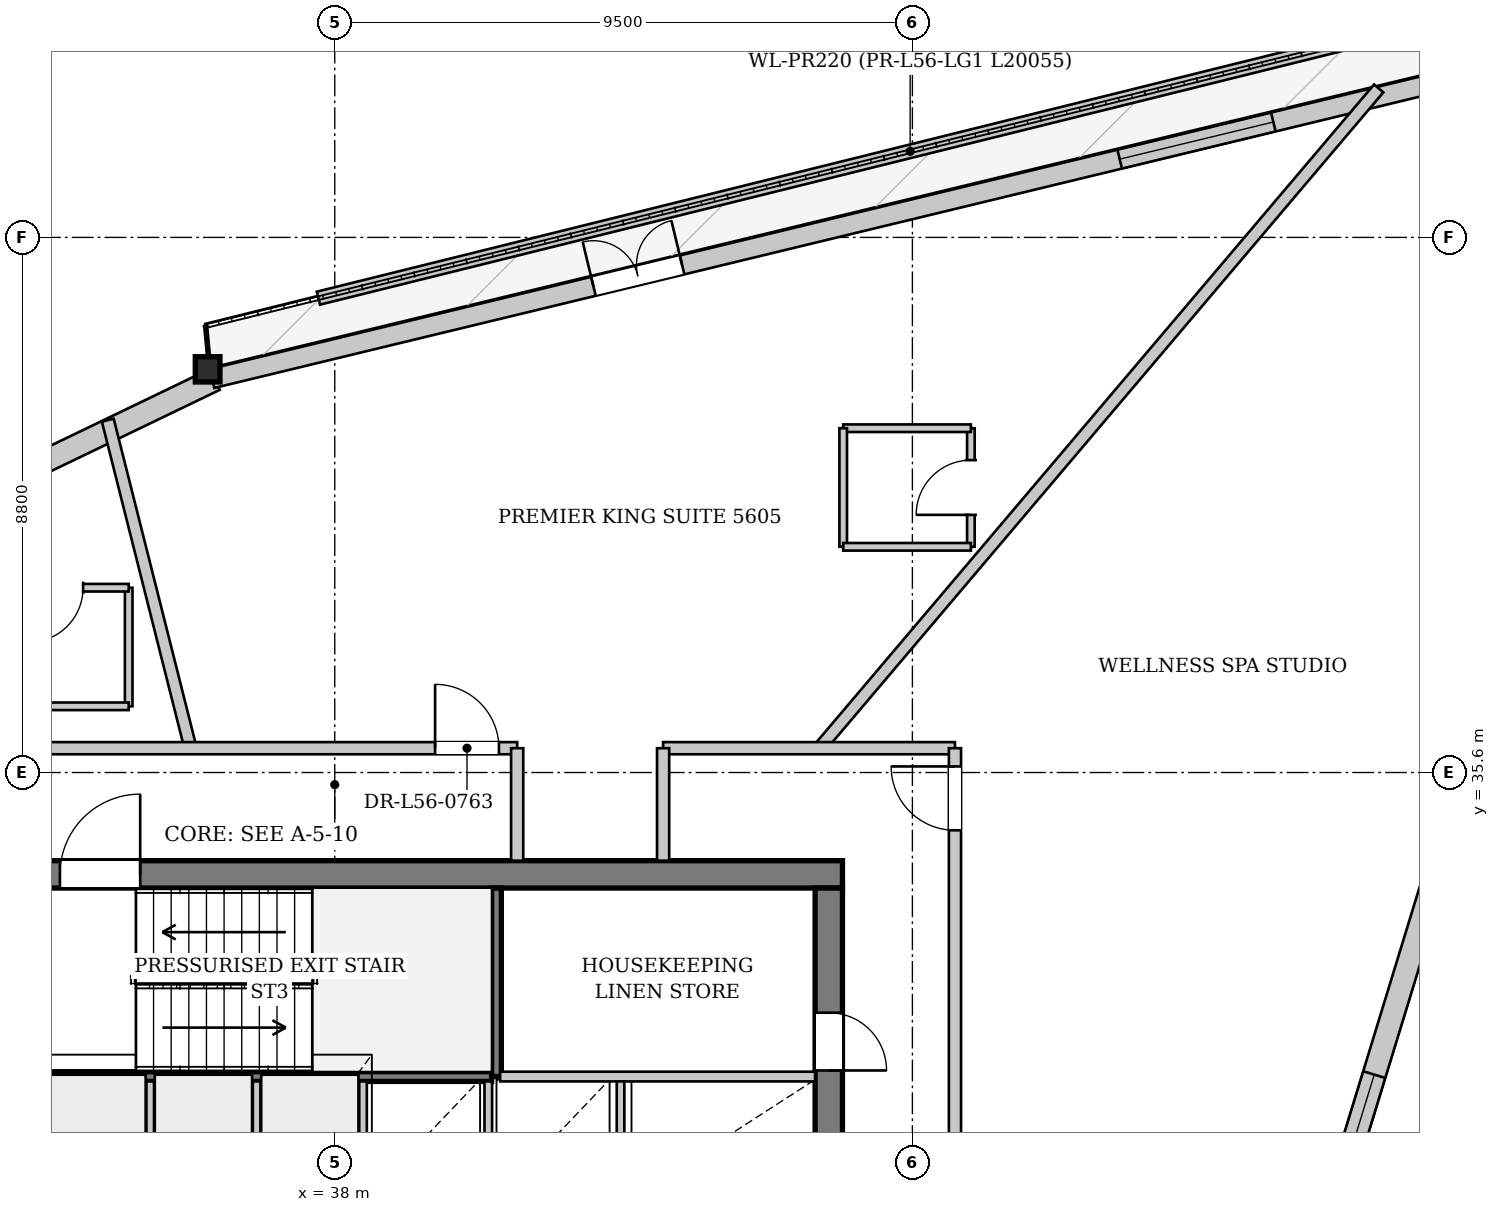
"""IFC4 building model, lengths in metres.
Left out: names, types, materials, properties, quantities, classifications, styles, units other than length and angle.
Written with IfcOpenShell. Run it as: python <this file> out.ifc"""

import sys

from ifc_helpers import new_model, si_unit, direction, frame, frame_2d, origin, origin_2d, place, context, subcontext, project, spatial, rectangle, i_section, extrude, source, transform, mapped, element, fill, save


model = new_model("IFC4")
c1 = context("Model", 3, precision=1e-05, world=origin(), true_north=direction((0.0, 1.0)))
c2 = subcontext(c1, "Body", "Model", "MODEL_VIEW")
j1 = project(units=[si_unit("LENGTHUNIT", "METRE"), si_unit("PLANEANGLEUNIT", "RADIAN")], contexts=[c1])
p1 = place(None, origin())
s1 = spatial("IfcSite", under=j1, at=p1, CompositionType="ELEMENT")
p2 = place(p1, origin())
s2 = spatial("IfcBuilding", under=s1, at=p2, CompositionType="ELEMENT")
p3 = place(p2, frame((0.0, 0.0, 213.15)))
s3 = spatial("IfcBuildingStorey", under=s2, at=p3, CompositionType="ELEMENT", Elevation=213.15)
m1 = source(origin(), c2, "Body", "SweptSolid", [
    extrude(i_section(OverallWidth=0.406, OverallDepth=0.416, WebThickness=0.027, FlangeThickness=0.042, at=origin_2d()), origin(), (0.0, 0.0, 1.0), 3.386),
])
p4 = place(p3, frame((35.943, 42.235, 0.0), z_axis=(-0.02011846258, -0.002740149025, 0.999793848274), x_axis=(0.134954720894, -0.990851766567, 0.0)))
e1 = element("IfcColumn", 1, at=p4, inside=s3, PredefinedType="COLUMN", context=c2, shape_type="MappedRepresentation", body=[
    mapped(m1, transform((0.0, 0.0, 0.0), x_axis=(1.0, 0.0, 0.0), y_axis=(0.0, 1.0, 0.0), z_axis=(0.0, 0.0, 1.0), scale=1.0)),
])
p5 = place(p3, frame((15.745, 32.294, 0.0), z_axis=(0.0, 0.0, 1.0), x_axis=(0.900909174289, 0.434007672377, 0.0)))
e2 = element("IfcWall", 2, at=p5, inside=s3, PredefinedType="SOLIDWALL", context=c2, shape_type="SweptSolid", body=[
    extrude(rectangle(XDim=22.511, YDim=0.38, at=frame_2d((11.256, 0.0))), origin(), (0.0, 0.0, 1.0), 2.822),
])
p6 = place(p5, frame((5.653, 0.0, 0.452)))
e3 = element("IfcOpeningElement", 3, at=p6, cuts=e2, PredefinedType="OPENING", context=c2, shape_type="SweptSolid", body=[
    extrude(rectangle(XDim=2.2, YDim=2.25, at=frame_2d((1.1, 1.125))), frame((0.0, 0.2, 0.0), z_axis=(0.0, -1.0, 0.0), x_axis=(1.0, 0.0, 0.0)), (0.0, 0.0, 1.0), 0.4),
])
p7 = place(p5, frame((15.108, 0.0, 0.452)))
e4 = element("IfcOpeningElement", 4, at=p7, cuts=e2, PredefinedType="OPENING", context=c2, shape_type="SweptSolid", body=[
    extrude(rectangle(XDim=2.2, YDim=2.25, at=frame_2d((1.1, 1.125))), frame((0.0, 0.2, 0.0), z_axis=(0.0, -1.0, 0.0), x_axis=(1.0, 0.0, 0.0)), (0.0, 0.0, 1.0), 0.4),
])
p8 = place(p3, frame((35.981, 42.079, 0.0), z_axis=(0.0, 0.0, 1.0), x_axis=(0.97201999071, 0.234898143159, 0.0)))
e5 = element("IfcWall", 5, at=p8, inside=s3, PredefinedType="SOLIDWALL", context=c2, shape_type="SweptSolid", body=[
    extrude(rectangle(XDim=22.511, YDim=0.32, at=frame_2d((11.256, 0.0))), origin(), (0.0, 0.0, 1.0), 2.822),
])
p9 = place(p8, frame((6.454, 0.0, 0.0)))
e6 = element("IfcOpeningElement", 6, at=p9, cuts=e5, PredefinedType="OPENING", context=c2, shape_type="SweptSolid", body=[
    extrude(rectangle(XDim=1.5, YDim=2.3, at=frame_2d((0.75, 1.15))), frame((0.0, 0.17, 0.0), z_axis=(0.0, -1.0, 0.0), x_axis=(1.0, 0.0, 0.0)), (0.0, 0.0, 1.0), 0.34),
])
p10 = place(p8, frame((15.358, 0.0, 0.352)))
e7 = element("IfcOpeningElement", 7, at=p10, cuts=e5, PredefinedType="OPENING", context=c2, shape_type="SweptSolid", body=[
    extrude(rectangle(XDim=2.6, YDim=2.35, at=frame_2d((1.3, 1.175))), frame((0.0, 0.17, 0.0), z_axis=(0.0, -1.0, 0.0), x_axis=(1.0, 0.0, 0.0)), (0.0, 0.0, 1.0), 0.34),
])
p11 = place(p3, frame((59.639, 45.464, 0.0), z_axis=(0.0, 0.0, 1.0), x_axis=(-0.292879532816, -0.95614934987, 0.0)))
e8 = element("IfcWall", 8, at=p11, inside=s3, PredefinedType="SOLIDWALL", context=c2, shape_type="SweptSolid", body=[
    extrude(rectangle(XDim=23.072, YDim=0.38, at=frame_2d((11.536, 0.0))), origin(), (0.0, 0.0, 1.0), 2.822),
])
p12 = place(p11, frame((5.36, 0.0, 0.452)))
e9 = element("IfcOpeningElement", 9, at=p12, cuts=e8, PredefinedType="OPENING", context=c2, shape_type="SweptSolid", body=[
    extrude(rectangle(XDim=2.2, YDim=2.25, at=frame_2d((1.1, 1.125))), frame((0.0, 0.2, 0.0), z_axis=(0.0, -1.0, 0.0), x_axis=(1.0, 0.0, 0.0)), (0.0, 0.0, 1.0), 0.4),
])
p13 = place(p11, frame((15.512, 0.0, 0.452)))
e10 = element("IfcOpeningElement", 10, at=p13, cuts=e8, PredefinedType="OPENING", context=c2, shape_type="SweptSolid", body=[
    extrude(rectangle(XDim=2.2, YDim=2.25, at=frame_2d((1.1, 1.125))), frame((0.0, 0.2, 0.0), z_axis=(0.0, -1.0, 0.0), x_axis=(1.0, 0.0, 0.0)), (0.0, 0.0, 1.0), 0.4),
])
p14 = place(p3, frame((57.196, 48.23, 0.0), z_axis=(0.0, 0.0, 1.0), x_axis=(-0.970576322009, -0.240793694177, 0.0)))
e11 = element("IfcWall", 11, at=p14, inside=s3, PredefinedType="PARAPET", context=c2, shape_type="SweptSolid", body=[
    extrude(rectangle(XDim=20.055, YDim=0.22, at=frame_2d((10.027, 0.0))), origin(), (0.0, 0.0, 1.0), 0.3),
])
p15 = place(p3, frame((29.65, 33.925, 0.0), z_axis=(0.0, 0.0, 1.0), x_axis=(1.0, 0.0, 0.0)))
e12 = element("IfcWall", 12, at=p15, inside=s3, PredefinedType="SHEAR", context=c2, shape_type="SweptSolid", body=[
    extrude(rectangle(XDim=16.7, YDim=0.45, at=frame_2d((8.35, 0.0))), origin(), (0.0, 0.0, 1.0), 3.33),
])
p16 = place(p15, frame((1.45, 0.0, 0.0)))
e13 = element("IfcOpeningElement", 13, at=p16, cuts=e12, PredefinedType="OPENING", context=c2, shape_type="SweptSolid", body=[
    extrude(rectangle(XDim=0.95, YDim=2.1, at=frame_2d((0.475, 1.05))), frame((0.0, 0.235, 0.0), z_axis=(0.0, -1.0, 0.0), x_axis=(1.0, 0.0, 0.0)), (0.0, 0.0, 1.0), 0.47),
])
p17 = place(p15, frame((3.83, 0.0, 0.0)))
e14 = element("IfcOpeningElement", 14, at=p17, cuts=e12, PredefinedType="OPENING", context=c2, shape_type="SweptSolid", body=[
    extrude(rectangle(XDim=1.32, YDim=2.2, at=frame_2d((0.66, 1.1))), frame((0.0, 0.235, 0.0), z_axis=(0.0, -1.0, 0.0), x_axis=(1.0, 0.0, 0.0)), (0.0, 0.0, 1.0), 0.47),
])
p18 = place(p3, frame((46.125, 33.7, 0.0), z_axis=(0.0, 0.0, 1.0), x_axis=(0.0, -1.0, 0.0)))
e15 = element("IfcWall", 15, at=p18, inside=s3, PredefinedType="SHEAR", context=c2, shape_type="SweptSolid", body=[
    extrude(rectangle(XDim=14.2, YDim=0.45, at=frame_2d((7.1, 0.0))), origin(), (0.0, 0.0, 1.0), 3.33),
])
p19 = place(p18, frame((5.18, 0.0, 0.0)))
e16 = element("IfcOpeningElement", 16, at=p19, cuts=e15, PredefinedType="OPENING", context=c2, shape_type="SweptSolid", body=[
    extrude(rectangle(XDim=1.6, YDim=2.2, at=frame_2d((0.8, 1.1))), frame((0.0, 0.235, 0.0), z_axis=(0.0, -1.0, 0.0), x_axis=(1.0, 0.0, 0.0)), (0.0, 0.0, 1.0), 0.47),
])
p20 = place(p18, frame((2.05, 0.0, 0.0)))
e17 = element("IfcOpeningElement", 17, at=p20, cuts=e15, PredefinedType="OPENING", context=c2, shape_type="SweptSolid", body=[
    extrude(rectangle(XDim=0.95, YDim=2.1, at=frame_2d((0.475, 1.05))), frame((0.0, 0.235, 0.0), z_axis=(0.0, -1.0, 0.0), x_axis=(1.0, 0.0, 0.0)), (0.0, 0.0, 1.0), 0.47),
])
p21 = place(p3, frame((33.28, 30.6, 0.0), z_axis=(0.0, 0.0, 1.0), x_axis=(1.0, 0.0, 0.0)))
e18 = element("IfcWall", 18, at=p21, inside=s3, PredefinedType="PARTITIONING", context=c2, shape_type="SweptSolid", body=[
    extrude(rectangle(XDim=7.3, YDim=0.16, at=frame_2d((3.65, 0.0))), origin(), (0.0, 0.0, 1.0), 3.33),
])
p22 = place(p3, frame((40.66, 30.6, 0.0), z_axis=(0.0, 0.0, 1.0), x_axis=(0.0, 1.0, 0.0)))
e19 = element("IfcWall", 19, at=p22, inside=s3, PredefinedType="PARTITIONING", context=c2, shape_type="SweptSolid", body=[
    extrude(rectangle(XDim=3.1, YDim=0.16, at=frame_2d((1.55, 0.0))), origin(), (0.0, 0.0, 1.0), 3.33),
])
p23 = place(p3, frame((40.72, 30.6, 0.0), z_axis=(0.0, 0.0, 1.0), x_axis=(1.0, 0.0, 0.0)))
e20 = element("IfcWall", 20, at=p23, inside=s3, PredefinedType="PARTITIONING", context=c2, shape_type="SweptSolid", body=[
    extrude(rectangle(XDim=5.18, YDim=0.16, at=frame_2d((2.59, 0.0))), origin(), (0.0, 0.0, 1.0), 3.33),
])
for number, where, z_axis, x_axis in (
    (21, (34.965, 28.6, 0.0), (0.0, 0.0, 1.0), (0.0, 1.0, 0.0)),
    (22, (36.715, 28.6, 0.0), (0.0, 0.0, 1.0), (0.0, 1.0, 0.0)),
    (23, (38.465, 28.6, 0.0), (0.0, 0.0, 1.0), (0.0, 1.0, 0.0)),
    (24, (40.525, 28.6, 0.0), (0.0, 0.0, 1.0), (0.0, 1.0, 0.0)),
    (25, (42.7, 28.6, 0.0), (0.0, 0.0, 1.0), (0.0, 1.0, 0.0)),
):
    element("IfcWall", number, at=place(p3, frame(where, z_axis=z_axis, x_axis=x_axis)), inside=s3, PredefinedType="PARTITIONING", context=c2, shape_type="SweptSolid", body=[
        extrude(rectangle(XDim=1.92, YDim=0.125, at=frame_2d((0.96, 0.0))), origin(), (0.0, 0.0, 1.0), 3.33),
    ])
p24 = place(p3, frame((45.97, 36.0, 0.0), z_axis=(0.0, 0.0, 1.0), x_axis=(0.64669436859, 0.762749233781, 0.0)))
e26 = element("IfcWall", 26, at=p24, inside=s3, PredefinedType="PARTITIONING", context=c2, shape_type="SweptSolid", body=[
    extrude(rectangle(XDim=14.225, YDim=0.2, at=frame_2d((7.113, 0.0))), origin(), (0.0, 0.0, 1.0), 3.33),
])
p25 = place(p3, frame((35.628, 36.0, 0.0), z_axis=(0.0, 0.0, 1.0), x_axis=(-0.244651792325, 0.96961100474, 0.0)))
e27 = element("IfcWall", 27, at=p25, inside=s3, PredefinedType="PARTITIONING", context=c2, shape_type="SweptSolid", body=[
    extrude(rectangle(XDim=5.563, YDim=0.2, at=frame_2d((2.782, 0.0))), origin(), (0.0, 0.0, 1.0), 3.33),
])
p26 = place(p3, frame((48.462, 39.312, 0.0), z_axis=(0.0, 0.0, 1.0), x_axis=(0.0, 1.0, 0.0)))
e28 = element("IfcWall", 28, at=p26, inside=s3, PredefinedType="PARTITIONING", context=c2, shape_type="SweptSolid", body=[
    extrude(rectangle(XDim=1.95, YDim=0.125, at=frame_2d((0.975, 0.0))), origin(), (0.0, 0.0, 1.0), 3.33),
])
p27 = place(p26, frame((0.525, 0.0, 0.0)))
e29 = element("IfcOpeningElement", 29, at=p27, cuts=e28, PredefinedType="OPENING", context=c2, shape_type="SweptSolid", body=[
    extrude(rectangle(XDim=0.9, YDim=2.1, at=frame_2d((0.45, 1.05))), frame((0.0, 0.073, 0.0), z_axis=(0.0, -1.0, 0.0), x_axis=(1.0, 0.0, 0.0)), (0.0, 0.0, 1.0), 0.145),
])
p28 = place(p3, frame((48.462, 41.262, 0.0), z_axis=(0.0, 0.0, 1.0), x_axis=(-1.0, 0.0, 0.0)))
e30 = element("IfcWall", 30, at=p28, inside=s3, PredefinedType="PARTITIONING", context=c2, shape_type="SweptSolid", body=[
    extrude(rectangle(XDim=2.1, YDim=0.125, at=frame_2d((1.05, 0.0))), origin(), (0.0, 0.0, 1.0), 3.075),
])
p29 = place(p3, frame((46.362, 41.262, 0.0), z_axis=(0.0, 0.0, 1.0), x_axis=(0.0, -1.0, 0.0)))
e31 = element("IfcWall", 31, at=p29, inside=s3, PredefinedType="PARTITIONING", context=c2, shape_type="SweptSolid", body=[
    extrude(rectangle(XDim=1.95, YDim=0.125, at=frame_2d((0.975, 0.0))), origin(), (0.0, 0.0, 1.0), 3.33),
])
p30 = place(p3, frame((46.362, 39.312, 0.0), z_axis=(0.0, 0.0, 1.0), x_axis=(1.0, 0.0, 0.0)))
e32 = element("IfcWall", 32, at=p30, inside=s3, PredefinedType="PARTITIONING", context=c2, shape_type="SweptSolid", body=[
    extrude(rectangle(XDim=2.1, YDim=0.125, at=frame_2d((1.05, 0.0))), origin(), (0.0, 0.0, 1.0), 3.33),
])
p31 = place(p3, frame((34.611, 36.689, 0.0), z_axis=(0.0, 0.0, 1.0), x_axis=(0.0, 1.0, 0.0)))
e33 = element("IfcWall", 33, at=p31, inside=s3, PredefinedType="PARTITIONING", context=c2, shape_type="SweptSolid", body=[
    extrude(rectangle(XDim=1.95, YDim=0.125, at=frame_2d((0.975, 0.0))), origin(), (0.0, 0.0, 1.0), 3.33),
])
p32 = place(p3, frame((34.611, 38.639, 0.0), z_axis=(0.0, 0.0, 1.0), x_axis=(-1.0, 0.0, 0.0)))
e34 = element("IfcWall", 34, at=p32, inside=s3, PredefinedType="PARTITIONING", context=c2, shape_type="SweptSolid", body=[
    extrude(rectangle(XDim=2.4, YDim=0.125, at=frame_2d((1.2, 0.0))), origin(), (0.0, 0.0, 1.0), 3.33),
])
p33 = place(p32, frame((0.75, 0.0, 0.0)))
e35 = element("IfcOpeningElement", 35, at=p33, cuts=e34, PredefinedType="OPENING", context=c2, shape_type="SweptSolid", body=[
    extrude(rectangle(XDim=0.9, YDim=2.1, at=frame_2d((0.45, 1.05))), frame((0.0, 0.073, 0.0), z_axis=(0.0, -1.0, 0.0), x_axis=(1.0, 0.0, 0.0)), (0.0, 0.0, 1.0), 0.145),
])
p34 = place(p3, frame((32.211, 36.689, 0.0), z_axis=(0.0, 0.0, 1.0), x_axis=(1.0, 0.0, 0.0)))
e36 = element("IfcWall", 36, at=p34, inside=s3, PredefinedType="PARTITIONING", context=c2, shape_type="SweptSolid", body=[
    extrude(rectangle(XDim=2.4, YDim=0.125, at=frame_2d((1.2, 0.0))), origin(), (0.0, 0.0, 1.0), 3.33),
])
p35 = place(p3, frame((27.8, 36.0, 0.0), z_axis=(0.0, 0.0, 1.0), x_axis=(1.0, 0.0, 0.0)))
e37 = element("IfcWall", 37, at=p35, inside=s3, PredefinedType="PARTITIONING", context=c2, shape_type="SweptSolid", body=[
    extrude(rectangle(XDim=13.2, YDim=0.2, at=frame_2d((6.6, 0.0))), origin(), (0.0, 0.0, 1.0), 3.33),
])
p36 = place(p35, frame((11.85, 0.0, 0.0)))
e38 = element("IfcOpeningElement", 38, at=p36, cuts=e37, PredefinedType="OPENING", context=c2, shape_type="SweptSolid", body=[
    extrude(rectangle(XDim=1.05, YDim=2.2, at=frame_2d((0.525, 1.1))), frame((0.0, 0.11, 0.0), z_axis=(0.0, -1.0, 0.0), x_axis=(1.0, 0.0, 0.0)), (0.0, 0.0, 1.0), 0.22),
])
p37 = place(p35, frame((0.3, 0.0, 0.0)))
e39 = element("IfcOpeningElement", 39, at=p37, cuts=e37, PredefinedType="OPENING", context=c2, shape_type="SweptSolid", body=[
    extrude(rectangle(XDim=1.05, YDim=2.2, at=frame_2d((0.525, 1.1))), frame((0.0, 0.11, 0.0), z_axis=(0.0, -1.0, 0.0), x_axis=(1.0, 0.0, 0.0)), (0.0, 0.0, 1.0), 0.22),
])
p38 = place(p3, frame((41.0, 34.15, 0.0), z_axis=(0.0, 0.0, 1.0), x_axis=(0.0, 1.0, 0.0)))
e40 = element("IfcWall", 40, at=p38, inside=s3, PredefinedType="PARTITIONING", context=c2, shape_type="SweptSolid", body=[
    extrude(rectangle(XDim=1.85, YDim=0.2, at=frame_2d((0.925, 0.0))), origin(), (0.0, 0.0, 1.0), 3.33),
])
p39 = place(p3, frame((43.4, 36.0, 0.0), z_axis=(0.0, 0.0, 1.0), x_axis=(1.0, 0.0, 0.0)))
e41 = element("IfcWall", 41, at=p39, inside=s3, PredefinedType="PARTITIONING", context=c2, shape_type="SweptSolid", body=[
    extrude(rectangle(XDim=4.8, YDim=0.2, at=frame_2d((2.4, 0.0))), origin(), (0.0, 0.0, 1.0), 3.33),
])
p40 = place(p3, frame((43.4, 34.15, 0.0), z_axis=(0.0, 0.0, 1.0), x_axis=(0.0, 1.0, 0.0)))
e42 = element("IfcWall", 42, at=p40, inside=s3, PredefinedType="PARTITIONING", context=c2, shape_type="SweptSolid", body=[
    extrude(rectangle(XDim=1.85, YDim=0.2, at=frame_2d((0.925, 0.0))), origin(), (0.0, 0.0, 1.0), 3.33),
])
p41 = place(p3, frame((48.2, 17.2, 0.0), z_axis=(0.0, 0.0, 1.0), x_axis=(0.0, 1.0, 0.0)))
e43 = element("IfcWall", 43, at=p41, inside=s3, PredefinedType="PARTITIONING", context=c2, shape_type="SweptSolid", body=[
    extrude(rectangle(XDim=18.8, YDim=0.2, at=frame_2d((9.4, 0.0))), origin(), (0.0, 0.0, 1.0), 3.33),
])
p42 = place(p41, frame((2.616, 0.0, 0.0)))
e44 = element("IfcOpeningElement", 44, at=p42, cuts=e43, PredefinedType="OPENING", context=c2, shape_type="SweptSolid", body=[
    extrude(rectangle(XDim=1.05, YDim=2.2, at=frame_2d((0.525, 1.1))), frame((0.0, 0.11, 0.0), z_axis=(0.0, -1.0, 0.0), x_axis=(1.0, 0.0, 0.0)), (0.0, 0.0, 1.0), 0.22),
])
p43 = place(p41, frame((17.45, 0.0, 0.0)))
e45 = element("IfcOpeningElement", 45, at=p43, cuts=e43, PredefinedType="OPENING", context=c2, shape_type="SweptSolid", body=[
    extrude(rectangle(XDim=1.05, YDim=2.2, at=frame_2d((0.525, 1.1))), frame((0.0, 0.11, 0.0), z_axis=(0.0, -1.0, 0.0), x_axis=(1.0, 0.0, 0.0)), (0.0, 0.0, 1.0), 0.22),
])
m2 = source(origin(), c2, "Body", "SweptSolid", [
    extrude(rectangle(XDim=1.5, YDim=2.3, at=frame_2d((0.75, 1.15))), frame((0.0, 0.025, 0.0), z_axis=(0.0, -1.0, 0.0), x_axis=(1.0, 0.0, 0.0)), (0.0, 0.0, 1.0), 0.05),
])
p44 = place(p9, origin())
e46 = element("IfcDoor", 46, at=p44, inside=s3, OperationType="DOUBLE_DOOR_SINGLE_SWING", PredefinedType="DOOR", context=c2, shape_type="MappedRepresentation", body=[
    mapped(m2, transform((0.0, 0.0, 0.0), x_axis=(1.0, 0.0, 0.0), y_axis=(0.0, 1.0, 0.0), z_axis=(0.0, 0.0, 1.0), scale=1.0)),
])
fill(e6, e46)
m3 = source(origin(), c2, "Body", "SweptSolid", [
    extrude(rectangle(XDim=2.6, YDim=2.35, at=frame_2d((1.3, 1.175))), frame((0.0, 0.03, 0.0), z_axis=(0.0, -1.0, 0.0), x_axis=(1.0, 0.0, 0.0)), (0.0, 0.0, 1.0), 0.06),
])
p45 = place(p10, origin())
e47 = element("IfcWindow", 47, at=p45, inside=s3, PartitioningType="SINGLE_PANEL", PredefinedType="WINDOW", context=c2, shape_type="MappedRepresentation", body=[
    mapped(m3, transform((0.0, 0.0, 0.0), x_axis=(1.0, 0.0, 0.0), y_axis=(0.0, 1.0, 0.0), z_axis=(0.0, 0.0, 1.0), scale=1.0)),
])
fill(e7, e47)
m4 = source(origin(), c2, "Body", "SweptSolid", [
    extrude(rectangle(XDim=2.2, YDim=2.25, at=frame_2d((1.1, 1.125))), frame((0.0, 0.03, 0.0), z_axis=(0.0, -1.0, 0.0), x_axis=(1.0, 0.0, 0.0)), (0.0, 0.0, 1.0), 0.06),
])
p46 = place(p13, origin())
e48 = element("IfcWindow", 48, at=p46, inside=s3, PartitioningType="SINGLE_PANEL", PredefinedType="WINDOW", context=c2, shape_type="MappedRepresentation", body=[
    mapped(m4, transform((0.0, 0.0, 0.0), x_axis=(1.0, 0.0, 0.0), y_axis=(0.0, 1.0, 0.0), z_axis=(0.0, 0.0, 1.0), scale=1.0)),
])
fill(e10, e48)
m5 = source(origin(), c2, "Body", "SweptSolid", [
    extrude(rectangle(XDim=1.32, YDim=2.2, at=frame_2d((0.66, 1.1))), frame((0.0, 0.025, 0.0), z_axis=(0.0, -1.0, 0.0), x_axis=(1.0, 0.0, 0.0)), (0.0, 0.0, 1.0), 0.05),
])
p47 = place(p17, origin())
e49 = element("IfcDoor", 49, at=p47, inside=s3, OperationType="SINGLE_SWING_RIGHT", PredefinedType="DOOR", context=c2, shape_type="MappedRepresentation", body=[
    mapped(m5, transform((0.0, 0.0, 0.0), x_axis=(1.0, 0.0, 0.0), y_axis=(0.0, 1.0, 0.0), z_axis=(0.0, 0.0, 1.0), scale=1.0)),
])
fill(e14, e49)
m6 = source(origin(), c2, "Body", "SweptSolid", [
    extrude(rectangle(XDim=0.95, YDim=2.1, at=frame_2d((0.475, 1.05))), frame((0.0, 0.025, 0.0), z_axis=(0.0, -1.0, 0.0), x_axis=(1.0, 0.0, 0.0)), (0.0, 0.0, 1.0), 0.05),
])
p48 = place(p20, origin())
e50 = element("IfcDoor", 50, at=p48, inside=s3, OperationType="SINGLE_SWING_RIGHT", PredefinedType="DOOR", context=c2, shape_type="MappedRepresentation", body=[
    mapped(m6, transform((0.0, 0.0, 0.0), x_axis=(1.0, 0.0, 0.0), y_axis=(0.0, 1.0, 0.0), z_axis=(0.0, 0.0, 1.0), scale=1.0)),
])
fill(e17, e50)
m7 = source(origin(), c2, "Body", "SweptSolid", [
    extrude(rectangle(XDim=0.9, YDim=2.1, at=frame_2d((0.45, 1.05))), frame((0.0, 0.025, 0.0), z_axis=(0.0, -1.0, 0.0), x_axis=(1.0, 0.0, 0.0)), (0.0, 0.0, 1.0), 0.05),
])
p49 = place(p27, origin())
e51 = element("IfcDoor", 51, at=p49, inside=s3, OperationType="SINGLE_SWING_LEFT", PredefinedType="DOOR", context=c2, shape_type="MappedRepresentation", body=[
    mapped(m7, transform((0.0, 0.0, 0.0), x_axis=(1.0, 0.0, 0.0), y_axis=(0.0, 1.0, 0.0), z_axis=(0.0, 0.0, 1.0), scale=1.0)),
])
fill(e29, e51)
p50 = place(p33, origin())
e52 = element("IfcDoor", 52, at=p50, inside=s3, OperationType="SINGLE_SWING_RIGHT", PredefinedType="DOOR", context=c2, shape_type="MappedRepresentation", body=[
    mapped(m7, transform((0.0, 0.0, 0.0), x_axis=(1.0, 0.0, 0.0), y_axis=(0.0, 1.0, 0.0), z_axis=(0.0, 0.0, 1.0), scale=1.0)),
])
fill(e35, e52)
m8 = source(origin(), c2, "Body", "SweptSolid", [
    extrude(rectangle(XDim=1.05, YDim=2.2, at=frame_2d((0.525, 1.1))), frame((0.0, 0.025, 0.0), z_axis=(0.0, -1.0, 0.0), x_axis=(1.0, 0.0, 0.0)), (0.0, 0.0, 1.0), 0.05),
])
p51 = place(p36, origin())
e53 = element("IfcDoor", 53, at=p51, inside=s3, OperationType="SINGLE_SWING_LEFT", PredefinedType="DOOR", context=c2, shape_type="MappedRepresentation", body=[
    mapped(m8, transform((0.0, 0.0, 0.0), x_axis=(1.0, 0.0, 0.0), y_axis=(0.0, 1.0, 0.0), z_axis=(0.0, 0.0, 1.0), scale=1.0)),
])
fill(e38, e53)
p52 = place(p43, origin())
e54 = element("IfcDoor", 54, at=p52, inside=s3, OperationType="SINGLE_SWING_RIGHT", PredefinedType="DOOR", context=c2, shape_type="MappedRepresentation", body=[
    mapped(m8, transform((0.0, 0.0, 0.0), x_axis=(1.0, 0.0, 0.0), y_axis=(0.0, 1.0, 0.0), z_axis=(0.0, 0.0, 1.0), scale=1.0)),
])
fill(e45, e54)
save(model, sys.argv[1])
